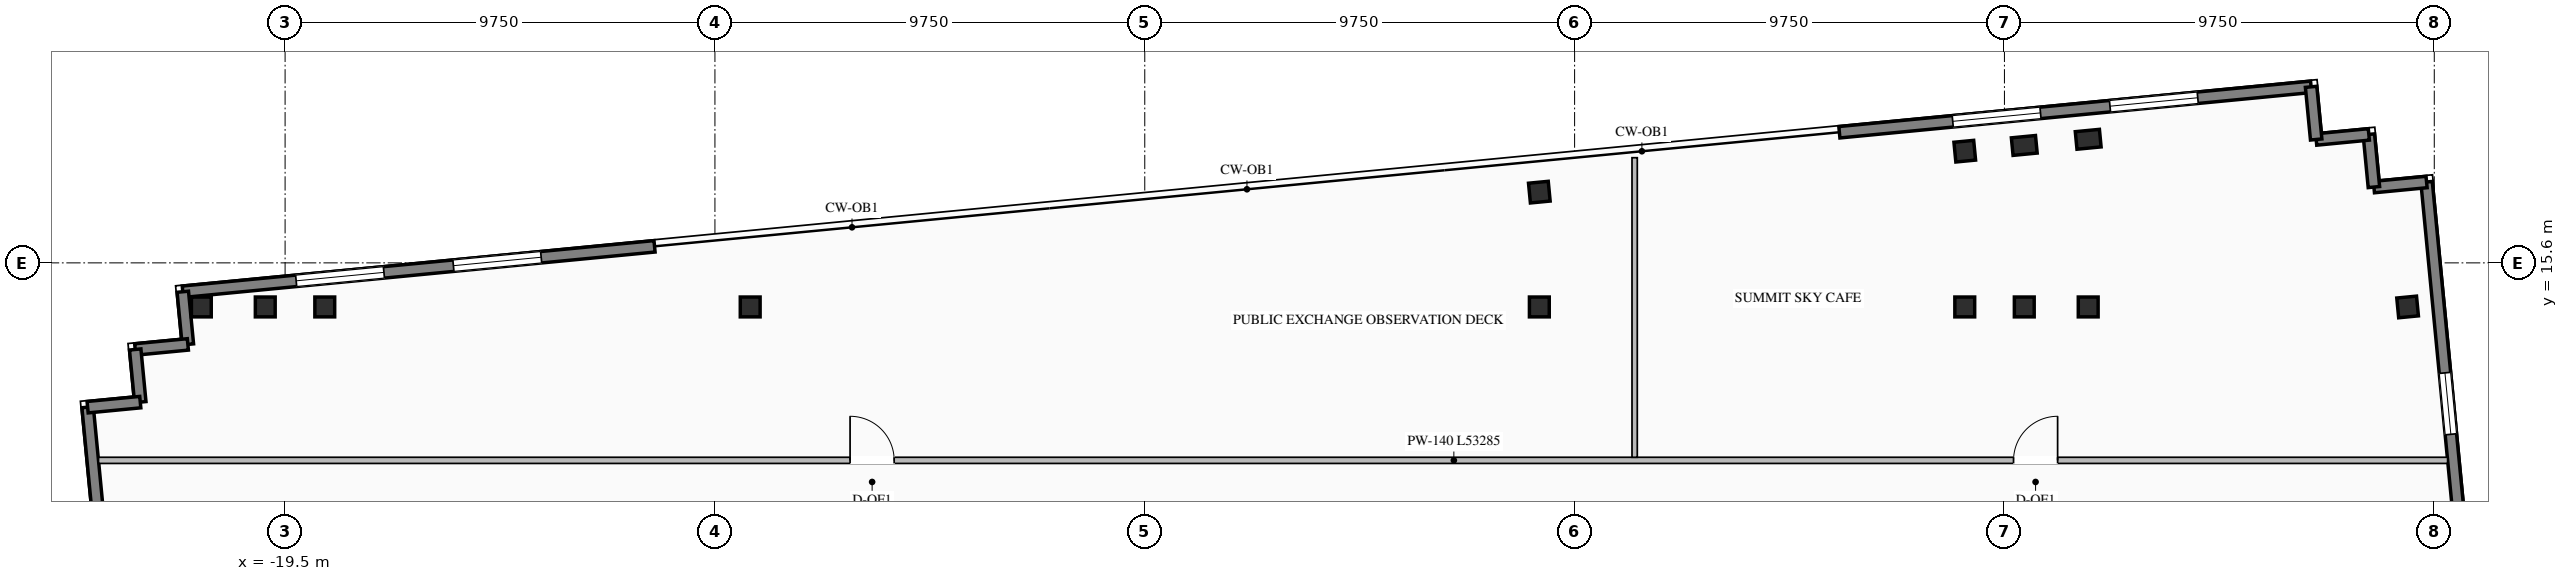
"""IFC4 building model, lengths in metres.
Left out: names, types, materials, properties, quantities, classifications, styles, units other than length and angle.
Written with IfcOpenShell. Run it as: python <this file> out.ifc"""

import sys

from ifc_helpers import new_model, si_unit, direction, frame, frame_2d, origin, origin_2d, place, context, subcontext, project, spatial, rectangle, i_section, extrude, element, fill, save


model = new_model("IFC4")
c1 = context("Model", 3, precision=1e-05, world=origin(), true_north=direction((0.0, 1.0)))
c2 = subcontext(c1, "Body", "Model", "MODEL_VIEW")
j1 = project(units=[si_unit("LENGTHUNIT", "METRE"), si_unit("PLANEANGLEUNIT", "RADIAN")], contexts=[c1])
p1 = place(None, origin())
s1 = spatial("IfcSite", under=j1, at=p1, CompositionType="ELEMENT")
p2 = place(p1, origin())
s2 = spatial("IfcBuilding", under=s1, at=p2, CompositionType="ELEMENT")
p3 = place(p2, frame((0.0, 0.0, 282.75)))
s3 = spatial("IfcBuildingStorey", under=s2, at=p3, CompositionType="ELEMENT", Elevation=282.75)
for number, where, z_axis, x_axis in (
    (1, (-21.4, 14.6, 0.0), (0.0, 0.0, 1.0), (1.0, 0.0, 0.0)),
    (2, (-19.95, 14.6, 0.0), (0.0, 0.0, 1.0), (1.0, 0.0, 0.0)),
    (3, (-18.6, 14.6, 0.0), (0.0, 0.0, 1.0), (1.0, 0.0, 0.0)),
    (4, (-8.95, 14.6, 0.0), (0.0, 0.0, 1.0), (1.0, 0.0, 0.0)),
    (5, (8.95, 14.6, 0.0), (0.0, 0.0, 1.0), (1.0, 0.0, 0.0)),
    (6, (18.6, 14.6, 0.0), (0.0, 0.0, 1.0), (1.0, 0.0, 0.0)),
    (7, (19.95, 14.6, 0.0), (0.0, 0.0, 1.0), (1.0, 0.0, 0.0)),
    (8, (21.4, 14.6, 0.0), (0.0, 0.0, 1.0), (1.0, 0.0, 0.0)),
    (9, (8.95, 17.205, 0.0), (0.0, 0.0, 1.0), (0.995, 0.096, 0.0)),
    (10, (18.6, 18.134, 0.0), (0.0, 0.0, 1.0), (0.995, 0.096, 0.0)),
    (11, (28.645, 14.6, 0.0), (0.0, 0.0, 1.0), (0.995, 0.096, 0.0)),
):
    element("IfcColumn", number, at=place(p3, frame(where, z_axis=z_axis, x_axis=x_axis)), inside=s3, PredefinedType="COLUMN", context=c2, shape_type="SweptSolid", body=[
        extrude(i_section(OverallWidth=0.45, OverallDepth=0.45, WebThickness=0.022, FlangeThickness=0.032, at=origin_2d()), origin(), (0.0, 0.0, 1.0), 4.2),
    ])
for number, where, z_axis, x_axis in (
    (12, (19.95, 18.264, 0.0), (0.0, 0.0, 1.0), (0.995, 0.096, 0.0)),
    (13, (21.4, 18.403, 0.0), (0.0, 0.0, 1.0), (0.995, 0.096, 0.0)),
):
    element("IfcColumn", number, at=place(p3, frame(where, z_axis=z_axis, x_axis=x_axis)), inside=s3, PredefinedType="PILASTER", context=c2, shape_type="SweptSolid", body=[
        extrude(rectangle(XDim=0.55, YDim=0.4, at=origin_2d()), origin(), (0.0, 0.0, 1.0), 4.2),
    ])
p4 = place(p3, frame((-21.821, 14.945, 0.0), z_axis=(0.0, 0.0, 1.0), x_axis=(0.995394787719, 0.095860401528, 0.0)))
e14 = element("IfcWall", 14, at=p4, inside=s3, PredefinedType="STANDARD", context=c2, shape_type="SweptSolid", body=[
    extrude(rectangle(XDim=10.75, YDim=0.26, at=frame_2d((5.375, 0.0))), origin(), (0.0, 0.0, 1.0), 3.93),
])
p5 = place(p4, frame((2.583, 0.0, 0.76)))
e15 = element("IfcOpeningElement", 15, at=p5, cuts=e14, PredefinedType="OPENING", context=c2, shape_type="SweptSolid", body=[
    extrude(rectangle(XDim=2.0, YDim=2.05, at=frame_2d((1.0, 1.025))), frame((0.0, 0.14, 0.0), z_axis=(0.0, -1.0, 0.0), x_axis=(1.0, 0.0, 0.0)), (0.0, 0.0, 1.0), 0.28),
])
p6 = place(p4, frame((6.167, 0.0, 0.76)))
e16 = element("IfcOpeningElement", 16, at=p6, cuts=e14, PredefinedType="OPENING", context=c2, shape_type="SweptSolid", body=[
    extrude(rectangle(XDim=2.0, YDim=2.05, at=frame_2d((1.0, 1.025))), frame((0.0, 0.14, 0.0), z_axis=(0.0, -1.0, 0.0), x_axis=(1.0, 0.0, 0.0)), (0.0, 0.0, 1.0), 0.28),
])
p7 = place(p3, frame((15.756, 18.563, 0.0), z_axis=(0.0, 0.0, 1.0), x_axis=(0.995396745868, 0.095840066339, 0.0)))
e17 = element("IfcWall", 17, at=p7, inside=s3, PredefinedType="STANDARD", context=c2, shape_type="SweptSolid", body=[
    extrude(rectangle(XDim=10.75, YDim=0.26, at=frame_2d((5.375, 0.0))), origin(), (0.0, 0.0, 1.0), 3.93),
])
p8 = place(p7, frame((2.583, 0.0, 0.76)))
e18 = element("IfcOpeningElement", 18, at=p8, cuts=e17, PredefinedType="OPENING", context=c2, shape_type="SweptSolid", body=[
    extrude(rectangle(XDim=2.0, YDim=2.05, at=frame_2d((1.0, 1.025))), frame((0.0, 0.14, 0.0), z_axis=(0.0, -1.0, 0.0), x_axis=(1.0, 0.0, 0.0)), (0.0, 0.0, 1.0), 0.28),
])
p9 = place(p7, frame((6.167, 0.0, 0.76)))
e19 = element("IfcOpeningElement", 19, at=p9, cuts=e17, PredefinedType="OPENING", context=c2, shape_type="SweptSolid", body=[
    extrude(rectangle(XDim=2.0, YDim=2.05, at=frame_2d((1.0, 1.025))), frame((0.0, 0.14, 0.0), z_axis=(0.0, -1.0, 0.0), x_axis=(1.0, 0.0, 0.0)), (0.0, 0.0, 1.0), 0.28),
])
p10 = place(p3, frame((-22.527, -2.754, 0.0), z_axis=(0.0, 0.0, 1.0), x_axis=(-0.095850890337, 0.995395703638, 0.0)))
e20 = element("IfcWall", 20, at=p10, inside=s3, PredefinedType="STANDARD", context=c2, shape_type="SweptSolid", body=[
    extrude(rectangle(XDim=15.15, YDim=0.26, at=frame_2d((7.575, 0.0))), origin(), (0.0, 0.0, 1.0), 3.93),
])
p11 = place(p10, frame((4.35, 0.0, 0.76)))
e21 = element("IfcOpeningElement", 21, at=p11, cuts=e20, PredefinedType="OPENING", context=c2, shape_type="SweptSolid", body=[
    extrude(rectangle(XDim=1.4, YDim=1.95, at=frame_2d((0.7, 0.975))), frame((0.0, 0.14, 0.0), z_axis=(0.0, -1.0, 0.0), x_axis=(1.0, 0.0, 0.0)), (0.0, 0.0, 1.0), 0.28),
])
p12 = place(p10, frame((9.4, 0.0, 0.76)))
e22 = element("IfcOpeningElement", 22, at=p12, cuts=e20, PredefinedType="OPENING", context=c2, shape_type="SweptSolid", body=[
    extrude(rectangle(XDim=1.4, YDim=1.95, at=frame_2d((0.7, 0.975))), frame((0.0, 0.14, 0.0), z_axis=(0.0, -1.0, 0.0), x_axis=(1.0, 0.0, 0.0)), (0.0, 0.0, 1.0), 0.28),
])
p13 = place(p3, frame((29.075, 17.435, 0.0), z_axis=(0.0, 0.0, 1.0), x_axis=(0.095850890337, -0.995395703638, 0.0)))
e23 = element("IfcWall", 23, at=p13, inside=s3, PredefinedType="STANDARD", context=c2, shape_type="SweptSolid", body=[
    extrude(rectangle(XDim=15.15, YDim=0.26, at=frame_2d((7.575, 0.0))), origin(), (0.0, 0.0, 1.0), 3.93),
])
p14 = place(p13, frame((4.35, 0.0, 0.76)))
e24 = element("IfcOpeningElement", 24, at=p14, cuts=e23, PredefinedType="OPENING", context=c2, shape_type="SweptSolid", body=[
    extrude(rectangle(XDim=1.4, YDim=1.95, at=frame_2d((0.7, 0.975))), frame((0.0, 0.14, 0.0), z_axis=(0.0, -1.0, 0.0), x_axis=(1.0, 0.0, 0.0)), (0.0, 0.0, 1.0), 0.28),
])
p15 = place(p13, frame((9.4, 0.0, 0.76)))
e25 = element("IfcOpeningElement", 25, at=p15, cuts=e23, PredefinedType="OPENING", context=c2, shape_type="SweptSolid", body=[
    extrude(rectangle(XDim=1.4, YDim=1.95, at=frame_2d((0.7, 0.975))), frame((0.0, 0.14, 0.0), z_axis=(0.0, -1.0, 0.0), x_axis=(1.0, 0.0, 0.0)), (0.0, 0.0, 1.0), 0.28),
])
for number, where, z_axis, x_axis in (
    (26, (29.075, 17.435, 0.0), (0.0, 0.0, 1.0), (-0.995, -0.096, 0.0)),
    (27, (27.881, 17.32, 0.0), (0.0, 0.0, 1.0), (-0.096, 0.995, 0.0)),
):
    element("IfcWall", number, at=place(p3, frame(where, z_axis=z_axis, x_axis=x_axis)), inside=s3, PredefinedType="STANDARD", context=c2, shape_type="SweptSolid", body=[
        extrude(rectangle(XDim=1.2, YDim=0.26, at=frame_2d((0.6, 0.0))), origin(), (0.0, 0.0, 1.0), 3.93),
    ])
for number, where, z_axis, x_axis in (
    (28, (27.766, 18.514, 0.0), (0.0, 0.0, 1.0), (-0.995, -0.096, 0.0)),
    (29, (26.571, 18.399, 0.0), (0.0, 0.0, 1.0), (-0.096, 0.995, 0.0)),
):
    element("IfcWall", number, at=place(p3, frame(where, z_axis=z_axis, x_axis=x_axis)), inside=s3, PredefinedType="STANDARD", context=c2, shape_type="SweptSolid", body=[
        extrude(rectangle(XDim=1.2, YDim=0.26, at=frame_2d((0.6, 0.0))), origin(), (0.0, 0.0, 1.0), 3.93),
    ])
p16 = place(p3, frame((-21.821, 14.945, 0.0), z_axis=(0.0, 0.0, 1.0), x_axis=(0.096038073607, -0.995377661201, 0.0)))
e30 = element("IfcWall", 30, at=p16, inside=s3, PredefinedType="STANDARD", context=c2, shape_type="SweptSolid", body=[
    extrude(rectangle(XDim=1.2, YDim=0.26, at=frame_2d((0.6, 0.0))), origin(), (0.0, 0.0, 1.0), 3.93),
])
for number, where, z_axis, x_axis in (
    (31, (-21.705, 13.75, 0.0), (0.0, 0.0, 1.0), (-0.995, -0.096, 0.0)),
    (32, (-22.9, 13.635, 0.0), (0.0, 0.0, 1.0), (0.096, -0.995, 0.0)),
    (33, (-22.785, 12.441, 0.0), (0.0, 0.0, 1.0), (-0.995, -0.096, 0.0)),
):
    element("IfcWall", number, at=place(p3, frame(where, z_axis=z_axis, x_axis=x_axis)), inside=s3, PredefinedType="STANDARD", context=c2, shape_type="SweptSolid", body=[
        extrude(rectangle(XDim=1.2, YDim=0.26, at=frame_2d((0.6, 0.0))), origin(), (0.0, 0.0, 1.0), 3.93),
    ])
p17 = place(p3, frame((-23.733, 11.12, 0.0), z_axis=(0.0, 0.0, 1.0), x_axis=(1.0, 0.0, 0.0)))
e34 = element("IfcWall", 34, at=p17, inside=s3, PredefinedType="STANDARD", context=c2, shape_type="SweptSolid", body=[
    extrude(rectangle(XDim=53.285, YDim=0.14, at=frame_2d((26.643, 0.0))), origin(), (0.0, 0.0, 1.0), 3.93),
])
p18 = place(p17, frame((17.048, 0.0, 0.0)))
e35 = element("IfcOpeningElement", 35, at=p18, cuts=e34, PredefinedType="OPENING", context=c2, shape_type="SweptSolid", body=[
    extrude(rectangle(XDim=1.0, YDim=2.08, at=frame_2d((0.5, 1.04))), frame((0.0, 0.08, 0.0), z_axis=(0.0, -1.0, 0.0), x_axis=(1.0, 0.0, 0.0)), (0.0, 0.0, 1.0), 0.16),
])
p19 = place(p17, frame((43.439, 0.0, 0.0)))
e36 = element("IfcOpeningElement", 36, at=p19, cuts=e34, PredefinedType="OPENING", context=c2, shape_type="SweptSolid", body=[
    extrude(rectangle(XDim=1.0, YDim=2.08, at=frame_2d((0.5, 1.04))), frame((0.0, 0.08, 0.0), z_axis=(0.0, -1.0, 0.0), x_axis=(1.0, 0.0, 0.0)), (0.0, 0.0, 1.0), 0.16),
])
p20 = place(p3, frame((11.112, 11.19, 0.0), z_axis=(0.0, 0.0, 1.0), x_axis=(0.0, 1.0, 0.0)))
e37 = element("IfcWall", 37, at=p20, inside=s3, PredefinedType="STANDARD", context=c2, shape_type="SweptSolid", body=[
    extrude(rectangle(XDim=6.795, YDim=0.12, at=frame_2d((3.398, 0.0))), origin(), (0.0, 0.0, 1.0), 3.93),
])
p21 = place(p5, origin())
e38 = element("IfcWindow", 38, at=p21, inside=s3, PartitioningType="DOUBLE_PANEL_VERTICAL", PredefinedType="WINDOW", context=c2, shape_type="SweptSolid", body=[
    extrude(rectangle(XDim=2.0, YDim=2.05, at=frame_2d((1.0, 1.025))), frame((0.0, 0.03, 0.0), z_axis=(0.0, -1.0, 0.0), x_axis=(1.0, 0.0, 0.0)), (0.0, 0.0, 1.0), 0.06),
])
fill(e15, e38)
p22 = place(p6, origin())
e39 = element("IfcWindow", 39, at=p22, inside=s3, PartitioningType="DOUBLE_PANEL_VERTICAL", PredefinedType="WINDOW", context=c2, shape_type="SweptSolid", body=[
    extrude(rectangle(XDim=2.0, YDim=2.05, at=frame_2d((1.0, 1.025))), frame((0.0, 0.03, 0.0), z_axis=(0.0, -1.0, 0.0), x_axis=(1.0, 0.0, 0.0)), (0.0, 0.0, 1.0), 0.06),
])
fill(e16, e39)
p23 = place(p8, origin())
e40 = element("IfcWindow", 40, at=p23, inside=s3, PartitioningType="DOUBLE_PANEL_VERTICAL", PredefinedType="WINDOW", context=c2, shape_type="SweptSolid", body=[
    extrude(rectangle(XDim=2.0, YDim=2.05, at=frame_2d((1.0, 1.025))), frame((0.0, 0.03, 0.0), z_axis=(0.0, -1.0, 0.0), x_axis=(1.0, 0.0, 0.0)), (0.0, 0.0, 1.0), 0.06),
])
fill(e18, e40)
p24 = place(p9, origin())
e41 = element("IfcWindow", 41, at=p24, inside=s3, PartitioningType="DOUBLE_PANEL_VERTICAL", PredefinedType="WINDOW", context=c2, shape_type="SweptSolid", body=[
    extrude(rectangle(XDim=2.0, YDim=2.05, at=frame_2d((1.0, 1.025))), frame((0.0, 0.03, 0.0), z_axis=(0.0, -1.0, 0.0), x_axis=(1.0, 0.0, 0.0)), (0.0, 0.0, 1.0), 0.06),
])
fill(e19, e41)
p25 = place(p14, origin())
e42 = element("IfcWindow", 42, at=p25, inside=s3, PartitioningType="SINGLE_PANEL", PredefinedType="WINDOW", context=c2, shape_type="SweptSolid", body=[
    extrude(rectangle(XDim=1.4, YDim=1.95, at=frame_2d((0.7, 0.975))), frame((0.0, 0.03, 0.0), z_axis=(0.0, -1.0, 0.0), x_axis=(1.0, 0.0, 0.0)), (0.0, 0.0, 1.0), 0.06),
])
fill(e24, e42)
p26 = place(p18, origin())
e43 = element("IfcDoor", 43, at=p26, inside=s3, OperationType="SINGLE_SWING_LEFT", PredefinedType="DOOR", context=c2, shape_type="SweptSolid", body=[
    extrude(rectangle(XDim=1.0, YDim=2.08, at=frame_2d((0.5, 1.04))), frame((0.0, 0.025, 0.0), z_axis=(0.0, -1.0, 0.0), x_axis=(1.0, 0.0, 0.0)), (0.0, 0.0, 1.0), 0.05),
])
fill(e35, e43)
p27 = place(p19, origin())
e44 = element("IfcDoor", 44, at=p27, inside=s3, OperationType="SINGLE_SWING_RIGHT", PredefinedType="DOOR", context=c2, shape_type="SweptSolid", body=[
    extrude(rectangle(XDim=1.0, YDim=2.08, at=frame_2d((0.5, 1.04))), frame((0.0, 0.025, 0.0), z_axis=(0.0, -1.0, 0.0), x_axis=(1.0, 0.0, 0.0)), (0.0, 0.0, 1.0), 0.05),
])
fill(e36, e44)
save(model, sys.argv[1])
